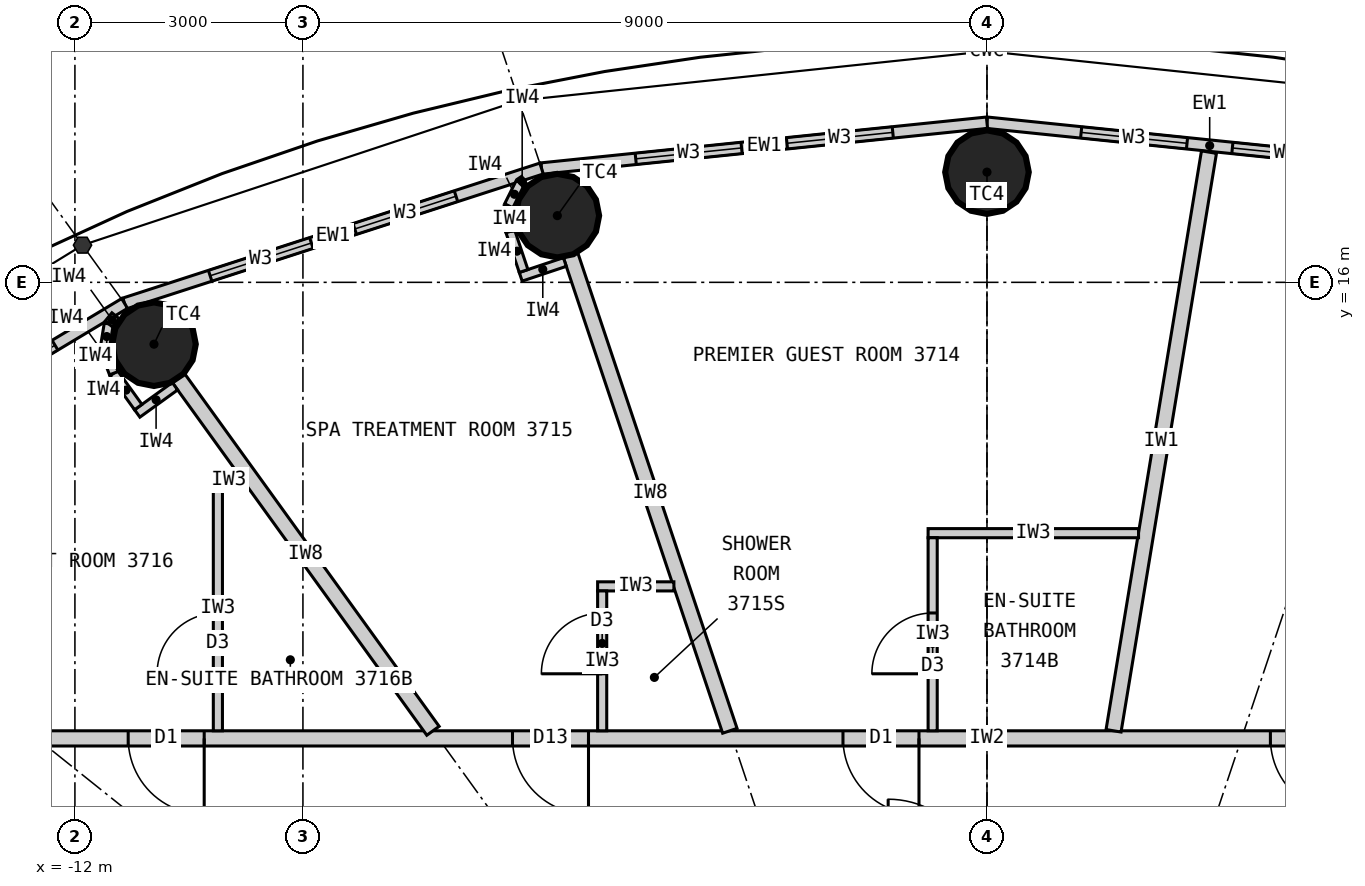
"""IFC4 building model, lengths in metres.
Left out: names, types, materials, properties, quantities, classifications, styles, units other than length and angle.
Written with IfcOpenShell. Run it as: python <this file> out.ifc"""

import sys

from ifc_helpers import new_model, si_unit, direction, frame, frame_2d, origin, origin_2d, place, context, subcontext, project, spatial, rectangle, circle, extrude, element, fill, save


model = new_model("IFC4")
c1 = context("Model", 3, precision=1e-05, world=origin(), true_north=direction((0.0, 1.0)))
c2 = subcontext(c1, "Body", "Model", "MODEL_VIEW")
j1 = project(units=[si_unit("LENGTHUNIT", "METRE"), si_unit("PLANEANGLEUNIT", "RADIAN")], contexts=[c1])
p1 = place(None, origin())
s1 = spatial("IfcSite", under=j1, at=p1, CompositionType="ELEMENT")
p2 = place(p1, origin())
s2 = spatial("IfcBuilding", under=s1, at=p2, CompositionType="ELEMENT")
p3 = place(p2, frame((0.0, 0.0, 143.4)))
s3 = spatial("IfcBuildingStorey", under=s2, at=p3, CompositionType="ELEMENT", Elevation=143.4)
for number, where, z_axis, x_axis in (
    (1, (0.0, 17.45, 0.0), (0.0, 0.0, 1.0), (1.0, 0.0, 0.0)),
    (2, (-5.653, 16.877, 0.0), (0.0, 0.0, 1.0), (1.0, 0.0, 0.0)),
    (3, (-10.96, 15.186, 0.0), (0.0, 0.0, 1.0), (1.0, 0.0, 0.0)),
):
    element("IfcColumn", number, at=place(p3, frame(where, z_axis=z_axis, x_axis=x_axis)), inside=s3, PredefinedType="COLUMN", context=c2, shape_type="SweptSolid", body=[
        extrude(circle(Radius=0.55, at=origin_2d()), origin(), (0.0, 0.0, 1.0), 3.3),
    ])
p4 = place(p3, frame((5.86, 17.497, 0.0), z_axis=(0.0, 0.0, 1.0), x_axis=(-0.994751738032, 0.102318032045, 0.0)))
e4 = element("IfcWall", 4, at=p4, inside=s3, PredefinedType="ELEMENTEDWALL", context=c2, shape_type="SweptSolid", body=[
    extrude(rectangle(XDim=5.891, YDim=0.15, at=frame_2d((2.946, 0.0))), origin(), (0.0, 0.0, 1.0), 3.12),
])
p5 = place(p4, frame((1.246, 0.0, 0.9)))
e5 = element("IfcOpeningElement", 5, at=p5, cuts=e4, PredefinedType="OPENING", context=c2, shape_type="SweptSolid", body=[
    extrude(rectangle(XDim=1.4, YDim=1.9, at=frame_2d((0.7, 0.95))), frame((0.0, 0.085, 0.0), z_axis=(0.0, -1.0, 0.0), x_axis=(1.0, 0.0, 0.0)), (0.0, 0.0, 1.0), 0.17),
])
p6 = place(p4, frame((3.246, 0.0, 0.9)))
e6 = element("IfcOpeningElement", 6, at=p6, cuts=e4, PredefinedType="OPENING", context=c2, shape_type="SweptSolid", body=[
    extrude(rectangle(XDim=1.4, YDim=1.9, at=frame_2d((0.7, 0.95))), frame((0.0, 0.085, 0.0), z_axis=(0.0, -1.0, 0.0), x_axis=(1.0, 0.0, 0.0)), (0.0, 0.0, 1.0), 0.17),
])
p7 = place(p3, frame((0.0, 18.1, 0.0), z_axis=(0.0, 0.0, 1.0), x_axis=(-0.994751738032, -0.102318032045, 0.0)))
e7 = element("IfcWall", 7, at=p7, inside=s3, PredefinedType="ELEMENTEDWALL", context=c2, shape_type="SweptSolid", body=[
    extrude(rectangle(XDim=5.891, YDim=0.15, at=frame_2d((2.946, 0.0))), origin(), (0.0, 0.0, 1.0), 3.12),
])
p8 = place(p7, frame((1.246, 0.0, 0.9)))
e8 = element("IfcOpeningElement", 8, at=p8, cuts=e7, PredefinedType="OPENING", context=c2, shape_type="SweptSolid", body=[
    extrude(rectangle(XDim=1.4, YDim=1.9, at=frame_2d((0.7, 0.95))), frame((0.0, 0.085, 0.0), z_axis=(0.0, -1.0, 0.0), x_axis=(1.0, 0.0, 0.0)), (0.0, 0.0, 1.0), 0.17),
])
p9 = place(p7, frame((3.246, 0.0, 0.9)))
e9 = element("IfcOpeningElement", 9, at=p9, cuts=e7, PredefinedType="OPENING", context=c2, shape_type="SweptSolid", body=[
    extrude(rectangle(XDim=1.4, YDim=1.9, at=frame_2d((0.7, 0.95))), frame((0.0, 0.085, 0.0), z_axis=(0.0, -1.0, 0.0), x_axis=(1.0, 0.0, 0.0)), (0.0, 0.0, 1.0), 0.17),
])
p10 = place(p3, frame((-5.86, 17.497, 0.0), z_axis=(0.0, 0.0, 1.0), x_axis=(-0.951432482129, -0.307857486429, 0.0)))
e10 = element("IfcWall", 10, at=p10, inside=s3, PredefinedType="ELEMENTEDWALL", context=c2, shape_type="SweptSolid", body=[
    extrude(rectangle(XDim=5.766, YDim=0.15, at=frame_2d((2.883, 0.0))), origin(), (0.0, 0.0, 1.0), 3.12),
])
p11 = place(p10, frame((1.183, 0.0, 0.9)))
e11 = element("IfcOpeningElement", 11, at=p11, cuts=e10, PredefinedType="OPENING", context=c2, shape_type="SweptSolid", body=[
    extrude(rectangle(XDim=1.4, YDim=1.9, at=frame_2d((0.7, 0.95))), frame((0.0, 0.085, 0.0), z_axis=(0.0, -1.0, 0.0), x_axis=(1.0, 0.0, 0.0)), (0.0, 0.0, 1.0), 0.17),
])
p12 = place(p10, frame((3.183, 0.0, 0.9)))
e12 = element("IfcOpeningElement", 12, at=p12, cuts=e10, PredefinedType="OPENING", context=c2, shape_type="SweptSolid", body=[
    extrude(rectangle(XDim=1.4, YDim=1.9, at=frame_2d((0.7, 0.95))), frame((0.0, 0.085, 0.0), z_axis=(0.0, -1.0, 0.0), x_axis=(1.0, 0.0, 0.0)), (0.0, 0.0, 1.0), 0.17),
])
p13 = place(p3, frame((-11.346, 15.722, 0.0), z_axis=(0.0, 0.0, 1.0), x_axis=(-0.857695199231, -0.514158482587, 0.0)))
e13 = element("IfcWall", 13, at=p13, inside=s3, PredefinedType="ELEMENTEDWALL", context=c2, shape_type="SweptSolid", body=[
    extrude(rectangle(XDim=5.536, YDim=0.15, at=frame_2d((2.768, 0.0))), origin(), (0.0, 0.0, 1.0), 3.12),
])
p14 = place(p13, frame((1.068, 0.0, 0.9)))
e14 = element("IfcOpeningElement", 14, at=p14, cuts=e13, PredefinedType="OPENING", context=c2, shape_type="SweptSolid", body=[
    extrude(rectangle(XDim=1.4, YDim=1.9, at=frame_2d((0.7, 0.95))), frame((0.0, 0.085, 0.0), z_axis=(0.0, -1.0, 0.0), x_axis=(1.0, 0.0, 0.0)), (0.0, 0.0, 1.0), 0.17),
])
p15 = place(p13, frame((3.068, 0.0, 0.9)))
e15 = element("IfcOpeningElement", 15, at=p15, cuts=e13, PredefinedType="OPENING", context=c2, shape_type="SweptSolid", body=[
    extrude(rectangle(XDim=1.4, YDim=1.9, at=frame_2d((0.7, 0.95))), frame((0.0, 0.085, 0.0), z_axis=(0.0, -1.0, 0.0), x_axis=(1.0, 0.0, 0.0)), (0.0, 0.0, 1.0), 0.17),
])
p16 = place(p3, frame((-14.1, 10.0, 0.0), z_axis=(0.0, 0.0, 1.0), x_axis=(1.0, 0.0, 0.0)))
e16 = element("IfcWall", 16, at=p16, inside=s3, PredefinedType="PARTITIONING", context=c2, shape_type="SweptSolid", body=[
    extrude(rectangle(XDim=28.2, YDim=0.2, at=frame_2d((14.1, 0.0))), origin(), (0.0, 0.0, 1.0), 3.12),
])
p17 = place(p16, frame((23.045, 0.0, 0.0)))
e17 = element("IfcOpeningElement", 17, at=p17, cuts=e16, PredefinedType="OPENING", context=c2, shape_type="SweptSolid", body=[
    extrude(rectangle(XDim=1.0, YDim=2.2, at=frame_2d((0.5, 1.1))), frame((0.0, 0.11, 0.0), z_axis=(0.0, -1.0, 0.0), x_axis=(1.0, 0.0, 0.0)), (0.0, 0.0, 1.0), 0.22),
])
p18 = place(p16, frame((17.829, 0.0, 0.0)))
e18 = element("IfcOpeningElement", 18, at=p18, cuts=e16, PredefinedType="OPENING", context=c2, shape_type="SweptSolid", body=[
    extrude(rectangle(XDim=1.0, YDim=2.2, at=frame_2d((0.5, 1.1))), frame((0.0, 0.11, 0.0), z_axis=(0.0, -1.0, 0.0), x_axis=(1.0, 0.0, 0.0)), (0.0, 0.0, 1.0), 0.22),
])
p19 = place(p16, frame((12.205, 0.0, 0.0)))
e19 = element("IfcOpeningElement", 19, at=p19, cuts=e16, PredefinedType="OPENING", context=c2, shape_type="SweptSolid", body=[
    extrude(rectangle(XDim=1.0, YDim=2.2, at=frame_2d((0.5, 1.1))), frame((0.0, 0.11, 0.0), z_axis=(0.0, -1.0, 0.0), x_axis=(1.0, 0.0, 0.0)), (0.0, 0.0, 1.0), 0.22),
])
p20 = place(p16, frame((7.857, 0.0, 0.0)))
e20 = element("IfcOpeningElement", 20, at=p20, cuts=e16, PredefinedType="OPENING", context=c2, shape_type="SweptSolid", body=[
    extrude(rectangle(XDim=1.0, YDim=2.2, at=frame_2d((0.5, 1.1))), frame((0.0, 0.11, 0.0), z_axis=(0.0, -1.0, 0.0), x_axis=(1.0, 0.0, 0.0)), (0.0, 0.0, 1.0), 0.22),
])
p21 = place(p16, frame((2.801, 0.0, 0.0)))
e21 = element("IfcOpeningElement", 21, at=p21, cuts=e16, PredefinedType="OPENING", context=c2, shape_type="SweptSolid", body=[
    extrude(rectangle(XDim=1.0, YDim=2.2, at=frame_2d((0.5, 1.1))), frame((0.0, 0.11, 0.0), z_axis=(0.0, -1.0, 0.0), x_axis=(1.0, 0.0, 0.0)), (0.0, 0.0, 1.0), 0.22),
])
p22 = place(p3, frame((1.666, 10.1, 0.0), z_axis=(0.0, 0.0, 1.0), x_axis=(0.162669562982, 0.986680603478, 0.0)))
e22 = element("IfcWall", 22, at=p22, inside=s3, PredefinedType="PARTITIONING", context=c2, shape_type="SweptSolid", body=[
    extrude(rectangle(XDim=7.716, YDim=0.2, at=frame_2d((3.858, 0.0))), origin(), (0.0, 0.0, 1.0), 3.12),
])
p23 = place(p3, frame((-3.383, 10.1, 0.0), z_axis=(0.0, 0.0, 1.0), x_axis=(-0.317615120474, 0.948219718866, 0.0)))
e23 = element("IfcWall", 23, at=p23, inside=s3, PredefinedType="PARTITIONING", context=c2, shape_type="SweptSolid", body=[
    extrude(rectangle(XDim=6.597, YDim=0.2, at=frame_2d((3.299, 0.0))), origin(), (0.0, 0.0, 1.0), 2.27),
])
p24 = place(p3, frame((-7.289, 10.1, 0.0), z_axis=(0.0, 0.0, 1.0), x_axis=(-0.585222595178, 0.810872686735, 0.0)))
e24 = element("IfcWall", 24, at=p24, inside=s3, PredefinedType="PARTITIONING", context=c2, shape_type="SweptSolid", body=[
    extrude(rectangle(XDim=5.722, YDim=0.2, at=frame_2d((2.861, 0.0))), origin(), (0.0, 0.0, 1.0), 2.27),
])
p25 = place(p3, frame((1.994, 12.7, 0.0), z_axis=(0.0, 0.0, 1.0), x_axis=(-1.0, 0.0, 0.0)))
e25 = element("IfcWall", 25, at=p25, inside=s3, PredefinedType="PARTITIONING", context=c2, shape_type="SweptSolid", body=[
    extrude(rectangle(XDim=2.769, YDim=0.12, at=frame_2d((1.384, 0.0))), origin(), (0.0, 0.0, 1.0), 3.12),
])
p26 = place(p3, frame((-0.715, 10.1, 0.0), z_axis=(0.0, 0.0, 1.0), x_axis=(0.0, 1.0, 0.0)))
e26 = element("IfcWall", 26, at=p26, inside=s3, PredefinedType="PARTITIONING", context=c2, shape_type="SweptSolid", body=[
    extrude(rectangle(XDim=2.54, YDim=0.12, at=frame_2d((1.27, 0.0))), origin(), (0.0, 0.0, 1.0), 3.12),
])
p27 = place(p26, frame((0.75, 0.0, 0.0)))
e27 = element("IfcOpeningElement", 27, at=p27, cuts=e26, PredefinedType="OPENING", context=c2, shape_type="SweptSolid", body=[
    extrude(rectangle(XDim=0.8, YDim=2.1, at=frame_2d((0.4, 1.05))), frame((0.0, 0.07, 0.0), z_axis=(0.0, -1.0, 0.0), x_axis=(1.0, 0.0, 0.0)), (0.0, 0.0, 1.0), 0.14),
])
p28 = place(p3, frame((-4.119, 12.0, 0.0), z_axis=(0.0, 0.0, 1.0), x_axis=(-1.0, 0.0, 0.0)))
e28 = element("IfcWall", 28, at=p28, inside=s3, PredefinedType="PARTITIONING", context=c2, shape_type="SweptSolid", body=[
    extrude(rectangle(XDim=1.004, YDim=0.12, at=frame_2d((0.502, 0.0))), origin(), (0.0, 0.0, 1.0), 3.12),
])
p29 = place(p3, frame((-5.063, 10.1, 0.0), z_axis=(0.0, 0.0, 1.0), x_axis=(0.0, 1.0, 0.0)))
e29 = element("IfcWall", 29, at=p29, inside=s3, PredefinedType="PARTITIONING", context=c2, shape_type="SweptSolid", body=[
    extrude(rectangle(XDim=1.84, YDim=0.12, at=frame_2d((0.92, 0.0))), origin(), (0.0, 0.0, 1.0), 3.12),
])
p30 = place(p29, frame((0.75, 0.0, 0.0)))
e30 = element("IfcOpeningElement", 30, at=p30, cuts=e29, PredefinedType="OPENING", context=c2, shape_type="SweptSolid", body=[
    extrude(rectangle(XDim=0.8, YDim=2.1, at=frame_2d((0.4, 1.05))), frame((0.0, 0.07, 0.0), z_axis=(0.0, -1.0, 0.0), x_axis=(1.0, 0.0, 0.0)), (0.0, 0.0, 1.0), 0.14),
])
p31 = place(p3, frame((-9.771, 13.4, 0.0), z_axis=(0.0, 0.0, 1.0), x_axis=(-1.0, 0.0, 0.0)))
e31 = element("IfcWall", 31, at=p31, inside=s3, PredefinedType="PARTITIONING", context=c2, shape_type="SweptSolid", body=[
    extrude(rectangle(XDim=0.408, YDim=0.12, at=frame_2d((0.204, 0.0))), origin(), (0.0, 0.0, 1.0), 3.12),
])
p32 = place(p3, frame((-10.119, 10.1, 0.0), z_axis=(0.0, 0.0, 1.0), x_axis=(0.0, 1.0, 0.0)))
e32 = element("IfcWall", 32, at=p32, inside=s3, PredefinedType="PARTITIONING", context=c2, shape_type="SweptSolid", body=[
    extrude(rectangle(XDim=3.24, YDim=0.12, at=frame_2d((1.62, 0.0))), origin(), (0.0, 0.0, 1.0), 3.12),
])
p33 = place(p32, frame((0.75, 0.0, 0.0)))
e33 = element("IfcOpeningElement", 33, at=p33, cuts=e32, PredefinedType="OPENING", context=c2, shape_type="SweptSolid", body=[
    extrude(rectangle(XDim=0.8, YDim=2.1, at=frame_2d((0.4, 1.05))), frame((0.0, 0.07, 0.0), z_axis=(0.0, -1.0, 0.0), x_axis=(1.0, 0.0, 0.0)), (0.0, 0.0, 1.0), 0.14),
])
p34 = place(p3, frame((-5.554, 16.267, 0.0), z_axis=(0.0, 0.0, 1.0), x_axis=(-0.948163683492, -0.317782361541, 0.0)))
e34 = element("IfcWall", 34, at=p34, inside=s3, PredefinedType="PARTITIONING", context=c2, shape_type="SweptSolid", body=[
    extrude(rectangle(XDim=0.612, YDim=0.12, at=frame_2d((0.306, 0.0))), origin(), (0.0, 0.0, 1.0), 3.12),
])
p35 = place(p3, frame((-6.097, 16.149, 0.0), z_axis=(0.0, 0.0, 1.0), x_axis=(-0.317292604854, 0.948327687514, 0.0)))
e35 = element("IfcWall", 35, at=p35, inside=s3, PredefinedType="PARTITIONING", context=c2, shape_type="SweptSolid", body=[
    extrude(rectangle(XDim=0.55, YDim=0.12, at=frame_2d((0.275, 0.0))), origin(), (0.0, 0.0, 1.0), 3.12),
])
for number, where, z_axis, x_axis in (
    (36, (-6.271, 16.67, 0.0), (0.0, 0.0, 1.0), (-0.061, 0.998, 0.0)),
    (37, (-6.292, 17.007, 0.0), (0.0, 0.0, 1.0), (0.445, 0.895, 0.0)),
):
    element("IfcWall", number, at=place(p3, frame(where, z_axis=z_axis, x_axis=x_axis)), inside=s3, PredefinedType="PARTITIONING", context=c2, shape_type="SweptSolid", body=[
        extrude(rectangle(XDim=0.338, YDim=0.12, at=frame_2d((0.169, 0.0))), origin(), (0.0, 0.0, 1.0), 3.12),
    ])
p36 = place(p3, frame((-6.142, 17.31, 0.0), z_axis=(0.0, 0.0, 1.0), x_axis=(0.835039693181, 0.550189704386, 0.0)))
e38 = element("IfcWall", 38, at=p36, inside=s3, PredefinedType="PARTITIONING", context=c2, shape_type="SweptSolid", body=[
    extrude(rectangle(XDim=0.062, YDim=0.12, at=frame_2d((0.031, 0.0))), origin(), (0.0, 0.0, 1.0), 3.12),
])
p37 = place(p3, frame((-10.684, 14.633, 0.0), z_axis=(0.0, 0.0, 1.0), x_axis=(-0.810921075692, -0.585155542568, 0.0)))
e39 = element("IfcWall", 39, at=p37, inside=s3, PredefinedType="PARTITIONING", context=c2, shape_type="SweptSolid", body=[
    extrude(rectangle(XDim=0.612, YDim=0.12, at=frame_2d((0.306, 0.0))), origin(), (0.0, 0.0, 1.0), 3.12),
])
p38 = place(p3, frame((-11.167, 14.359, 0.0), z_axis=(0.0, 0.0, 1.0), x_axis=(-0.585263549799, 0.810843127415, 0.0)))
e40 = element("IfcWall", 40, at=p38, inside=s3, PredefinedType="PARTITIONING", context=c2, shape_type="SweptSolid", body=[
    extrude(rectangle(XDim=0.55, YDim=0.12, at=frame_2d((0.275, 0.0))), origin(), (0.0, 0.0, 1.0), 3.12),
])
for number, where, z_axis, x_axis in (
    (41, (-11.489, 14.804, 0.0), (0.0, 0.0, 1.0), (-0.356, 0.935, 0.0)),
    (42, (-11.609, 15.12, 0.0), (0.0, 0.0, 1.0), (0.16, 0.987, 0.0)),
):
    element("IfcWall", number, at=place(p3, frame(where, z_axis=z_axis, x_axis=x_axis)), inside=s3, PredefinedType="PARTITIONING", context=c2, shape_type="SweptSolid", body=[
        extrude(rectangle(XDim=0.338, YDim=0.12, at=frame_2d((0.169, 0.0))), origin(), (0.0, 0.0, 1.0), 3.12),
    ])
p39 = place(p3, frame((-11.555, 15.453, 0.0), z_axis=(0.0, 0.0, 1.0), x_axis=(0.631711901025, 0.775203246964, 0.0)))
e43 = element("IfcWall", 43, at=p39, inside=s3, PredefinedType="PARTITIONING", context=c2, shape_type="SweptSolid", body=[
    extrude(rectangle(XDim=0.139, YDim=0.12, at=frame_2d((0.07, 0.0))), origin(), (0.0, 0.0, 1.0), 3.12),
])
p40 = place(p5, origin())
e44 = element("IfcWindow", 44, at=p40, inside=s3, PartitioningType="SINGLE_PANEL", PredefinedType="WINDOW", context=c2, shape_type="SweptSolid", body=[
    extrude(rectangle(XDim=1.4, YDim=1.9, at=frame_2d((0.7, 0.95))), frame((0.0, 0.03, 0.0), z_axis=(0.0, -1.0, 0.0), x_axis=(1.0, 0.0, 0.0)), (0.0, 0.0, 1.0), 0.06),
])
fill(e5, e44)
p41 = place(p6, origin())
e45 = element("IfcWindow", 45, at=p41, inside=s3, PartitioningType="SINGLE_PANEL", PredefinedType="WINDOW", context=c2, shape_type="SweptSolid", body=[
    extrude(rectangle(XDim=1.4, YDim=1.9, at=frame_2d((0.7, 0.95))), frame((0.0, 0.03, 0.0), z_axis=(0.0, -1.0, 0.0), x_axis=(1.0, 0.0, 0.0)), (0.0, 0.0, 1.0), 0.06),
])
fill(e6, e45)
p42 = place(p8, origin())
e46 = element("IfcWindow", 46, at=p42, inside=s3, PartitioningType="SINGLE_PANEL", PredefinedType="WINDOW", context=c2, shape_type="SweptSolid", body=[
    extrude(rectangle(XDim=1.4, YDim=1.9, at=frame_2d((0.7, 0.95))), frame((0.0, 0.03, 0.0), z_axis=(0.0, -1.0, 0.0), x_axis=(1.0, 0.0, 0.0)), (0.0, 0.0, 1.0), 0.06),
])
fill(e8, e46)
p43 = place(p9, origin())
e47 = element("IfcWindow", 47, at=p43, inside=s3, PartitioningType="SINGLE_PANEL", PredefinedType="WINDOW", context=c2, shape_type="SweptSolid", body=[
    extrude(rectangle(XDim=1.4, YDim=1.9, at=frame_2d((0.7, 0.95))), frame((0.0, 0.03, 0.0), z_axis=(0.0, -1.0, 0.0), x_axis=(1.0, 0.0, 0.0)), (0.0, 0.0, 1.0), 0.06),
])
fill(e9, e47)
p44 = place(p11, origin())
e48 = element("IfcWindow", 48, at=p44, inside=s3, PartitioningType="SINGLE_PANEL", PredefinedType="WINDOW", context=c2, shape_type="SweptSolid", body=[
    extrude(rectangle(XDim=1.4, YDim=1.9, at=frame_2d((0.7, 0.95))), frame((0.0, 0.03, 0.0), z_axis=(0.0, -1.0, 0.0), x_axis=(1.0, 0.0, 0.0)), (0.0, 0.0, 1.0), 0.06),
])
fill(e11, e48)
p45 = place(p12, origin())
e49 = element("IfcWindow", 49, at=p45, inside=s3, PartitioningType="SINGLE_PANEL", PredefinedType="WINDOW", context=c2, shape_type="SweptSolid", body=[
    extrude(rectangle(XDim=1.4, YDim=1.9, at=frame_2d((0.7, 0.95))), frame((0.0, 0.03, 0.0), z_axis=(0.0, -1.0, 0.0), x_axis=(1.0, 0.0, 0.0)), (0.0, 0.0, 1.0), 0.06),
])
fill(e12, e49)
p46 = place(p14, origin())
e50 = element("IfcWindow", 50, at=p46, inside=s3, PartitioningType="SINGLE_PANEL", PredefinedType="WINDOW", context=c2, shape_type="SweptSolid", body=[
    extrude(rectangle(XDim=1.4, YDim=1.9, at=frame_2d((0.7, 0.95))), frame((0.0, 0.03, 0.0), z_axis=(0.0, -1.0, 0.0), x_axis=(1.0, 0.0, 0.0)), (0.0, 0.0, 1.0), 0.06),
])
fill(e14, e50)
p47 = place(p18, origin())
e51 = element("IfcDoor", 51, at=p47, inside=s3, OperationType="SINGLE_SWING_RIGHT", PredefinedType="DOOR", context=c2, shape_type="SweptSolid", body=[
    extrude(rectangle(XDim=1.0, YDim=2.2, at=frame_2d((0.5, 1.1))), frame((0.0, 0.025, 0.0), z_axis=(0.0, -1.0, 0.0), x_axis=(1.0, 0.0, 0.0)), (0.0, 0.0, 1.0), 0.05),
])
fill(e18, e51)
p48 = place(p27, origin())
e52 = element("IfcDoor", 52, at=p48, inside=s3, OperationType="SINGLE_SWING_LEFT", PredefinedType="DOOR", context=c2, shape_type="SweptSolid", body=[
    extrude(rectangle(XDim=0.8, YDim=2.1, at=frame_2d((0.4, 1.05))), frame((0.0, 0.025, 0.0), z_axis=(0.0, -1.0, 0.0), x_axis=(1.0, 0.0, 0.0)), (0.0, 0.0, 1.0), 0.05),
])
fill(e27, e52)
p49 = place(p19, origin())
e53 = element("IfcDoor", 53, at=p49, inside=s3, OperationType="SINGLE_SWING_RIGHT", PredefinedType="DOOR", context=c2, shape_type="SweptSolid", body=[
    extrude(rectangle(XDim=1.0, YDim=2.2, at=frame_2d((0.5, 1.1))), frame((0.0, 0.025, 0.0), z_axis=(0.0, -1.0, 0.0), x_axis=(1.0, 0.0, 0.0)), (0.0, 0.0, 1.0), 0.05),
])
fill(e19, e53)
p50 = place(p30, origin())
e54 = element("IfcDoor", 54, at=p50, inside=s3, OperationType="SINGLE_SWING_LEFT", PredefinedType="DOOR", context=c2, shape_type="SweptSolid", body=[
    extrude(rectangle(XDim=0.8, YDim=2.1, at=frame_2d((0.4, 1.05))), frame((0.0, 0.025, 0.0), z_axis=(0.0, -1.0, 0.0), x_axis=(1.0, 0.0, 0.0)), (0.0, 0.0, 1.0), 0.05),
])
fill(e30, e54)
p51 = place(p20, origin())
e55 = element("IfcDoor", 55, at=p51, inside=s3, OperationType="SINGLE_SWING_RIGHT", PredefinedType="DOOR", context=c2, shape_type="SweptSolid", body=[
    extrude(rectangle(XDim=1.0, YDim=2.2, at=frame_2d((0.5, 1.1))), frame((0.0, 0.025, 0.0), z_axis=(0.0, -1.0, 0.0), x_axis=(1.0, 0.0, 0.0)), (0.0, 0.0, 1.0), 0.05),
])
fill(e20, e55)
p52 = place(p33, origin())
e56 = element("IfcDoor", 56, at=p52, inside=s3, OperationType="SINGLE_SWING_LEFT", PredefinedType="DOOR", context=c2, shape_type="SweptSolid", body=[
    extrude(rectangle(XDim=0.8, YDim=2.1, at=frame_2d((0.4, 1.05))), frame((0.0, 0.025, 0.0), z_axis=(0.0, -1.0, 0.0), x_axis=(1.0, 0.0, 0.0)), (0.0, 0.0, 1.0), 0.05),
])
fill(e33, e56)
p53 = place(p21, origin())
e57 = element("IfcDoor", 57, at=p53, inside=s3, OperationType="SINGLE_SWING_RIGHT", PredefinedType="DOOR", context=c2, shape_type="SweptSolid", body=[
    extrude(rectangle(XDim=1.0, YDim=2.2, at=frame_2d((0.5, 1.1))), frame((0.0, 0.025, 0.0), z_axis=(0.0, -1.0, 0.0), x_axis=(1.0, 0.0, 0.0)), (0.0, 0.0, 1.0), 0.05),
])
fill(e21, e57)
save(model, sys.argv[1])
